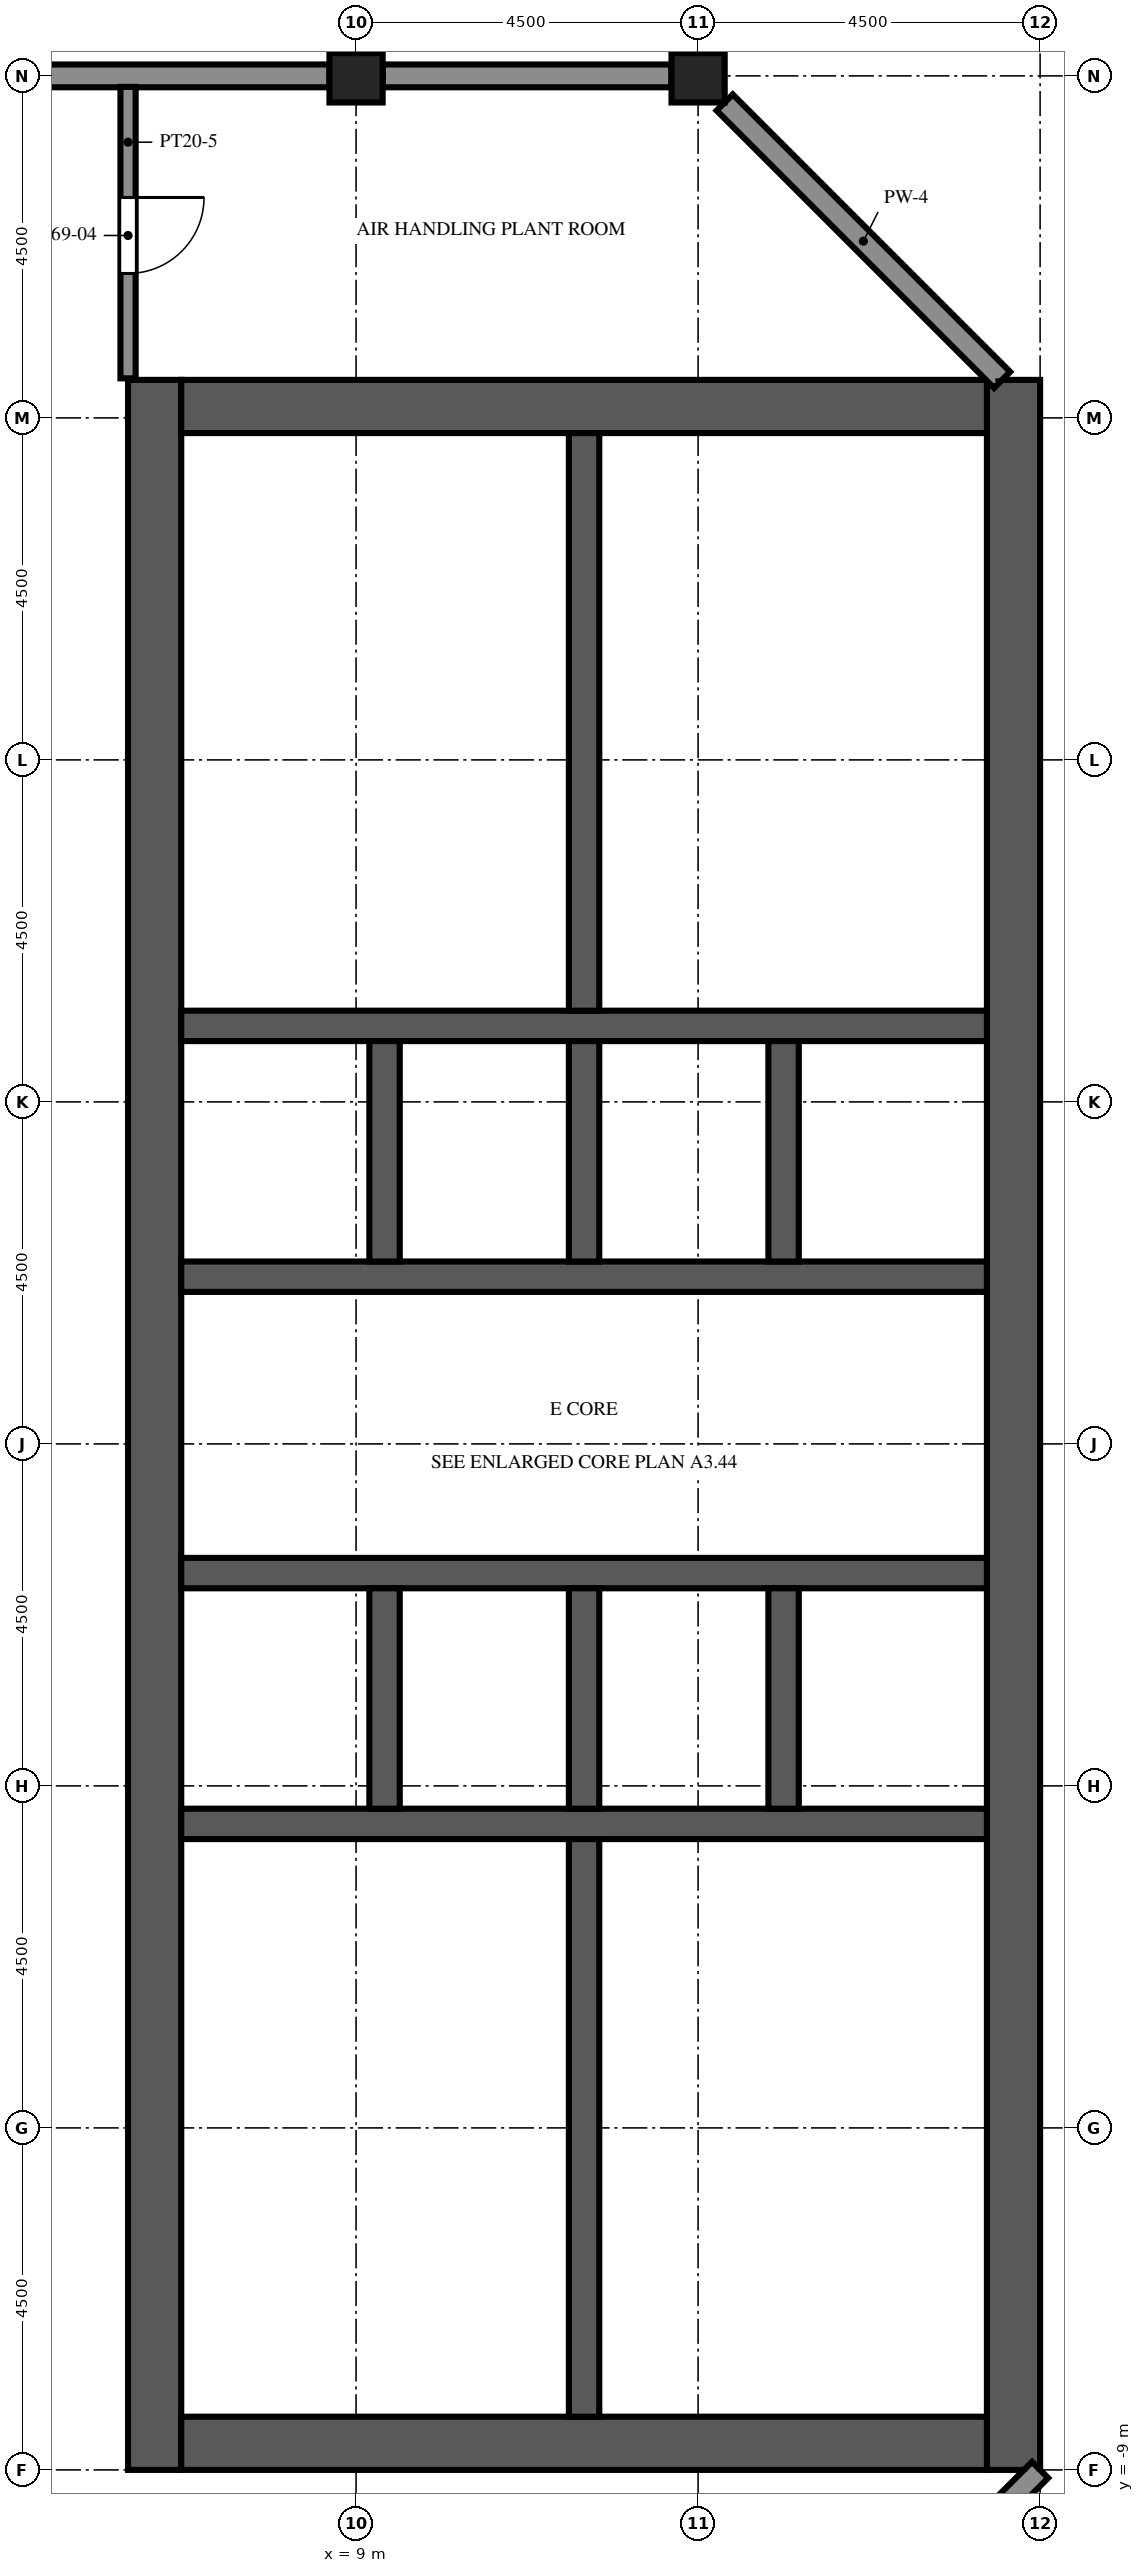
"""IFC4 building model, lengths in metres.
Left out: names, types, materials, properties, quantities, classifications, styles, units other than length and angle.
Written with IfcOpenShell. Run it as: python <this file> out.ifc"""

import sys

from ifc_helpers import new_model, si_unit, direction, frame, frame_2d, origin, origin_2d, place, context, subcontext, project, spatial, rectangle, extrude, element, fill, save


model = new_model("IFC4")
c1 = context("Model", 3, precision=1e-05, world=origin(), true_north=direction((0.0, 1.0)))
c2 = subcontext(c1, "Body", "Model", "MODEL_VIEW")
j1 = project(units=[si_unit("LENGTHUNIT", "METRE"), si_unit("PLANEANGLEUNIT", "RADIAN")], contexts=[c1])
p1 = place(None, origin())
s1 = spatial("IfcSite", under=j1, at=p1, CompositionType="ELEMENT")
p2 = place(p1, origin())
s2 = spatial("IfcBuilding", under=s1, at=p2, CompositionType="ELEMENT")
p3 = place(p2, frame((0.0, 0.0, 306.4)))
s3 = spatial("IfcBuildingStorey", under=s2, at=p3, CompositionType="ELEMENT", Elevation=306.4)
for number, where, z_axis, x_axis in (
    (1, (9.0, 22.5, 0.0), (0.0, 0.0, 1.0), (1.0, 0.0, 0.0)),
    (2, (13.5, 22.5, 0.0), (0.0, 0.0, 1.0), (1.0, 0.0, 0.0)),
):
    element("IfcColumn", number, at=place(p3, frame(where, z_axis=z_axis, x_axis=x_axis)), inside=s3, PredefinedType="COLUMN", context=c2, shape_type="SweptSolid", body=[
        extrude(rectangle(XDim=0.7, YDim=0.7, at=origin_2d()), origin(), (0.0, 0.0, 1.0), 5.4),
    ])
p4 = place(p3, frame((6.35, -9.0, 0.0), z_axis=(0.0, 0.0, 1.0), x_axis=(0.0, 1.0, 0.0)))
e3 = element("IfcWall", 3, at=p4, inside=s3, PredefinedType="SHEAR", context=c2, shape_type="SweptSolid", body=[
    extrude(rectangle(XDim=27.5, YDim=0.7, at=frame_2d((13.75, 0.0))), origin(), (0.0, 0.0, 1.0), 5.4),
])
p5 = place(p4, frame((12.55, 0.0, 0.0)))
e4 = element("IfcOpeningElement", 4, at=p5, cuts=e3, PredefinedType="OPENING", context=c2, shape_type="SweptSolid", body=[
    extrude(rectangle(XDim=2.4, YDim=2.4, at=frame_2d((1.2, 1.2))), frame((0.0, 0.36, 0.0), z_axis=(0.0, -1.0, 0.0), x_axis=(1.0, 0.0, 0.0)), (0.0, 0.0, 1.0), 0.72),
])
p6 = place(p4, frame((3.9, 0.0, 0.0)))
e5 = element("IfcOpeningElement", 5, at=p6, cuts=e3, PredefinedType="OPENING", context=c2, shape_type="SweptSolid", body=[
    extrude(rectangle(XDim=1.2, YDim=2.1, at=frame_2d((0.6, 1.05))), frame((0.0, 0.36, 0.0), z_axis=(0.0, -1.0, 0.0), x_axis=(1.0, 0.0, 0.0)), (0.0, 0.0, 1.0), 0.72),
])
p7 = place(p4, frame((22.4, 0.0, 0.0)))
e6 = element("IfcOpeningElement", 6, at=p7, cuts=e3, PredefinedType="OPENING", context=c2, shape_type="SweptSolid", body=[
    extrude(rectangle(XDim=1.2, YDim=2.1, at=frame_2d((0.6, 1.05))), frame((0.0, 0.36, 0.0), z_axis=(0.0, -1.0, 0.0), x_axis=(1.0, 0.0, 0.0)), (0.0, 0.0, 1.0), 0.72),
])
p8 = place(p3, frame((17.65, -9.0, 0.0), z_axis=(0.0, 0.0, 1.0), x_axis=(0.0, 1.0, 0.0)))
e7 = element("IfcWall", 7, at=p8, inside=s3, PredefinedType="SHEAR", context=c2, shape_type="SweptSolid", body=[
    extrude(rectangle(XDim=27.5, YDim=0.7, at=frame_2d((13.75, 0.0))), origin(), (0.0, 0.0, 1.0), 5.4),
])
for number, where, z_axis, x_axis in (
    (8, (6.7, -8.65, 0.0), (0.0, 0.0, 1.0), (1.0, 0.0, 0.0)),
    (9, (6.7, 18.15, 0.0), (0.0, 0.0, 1.0), (1.0, 0.0, 0.0)),
):
    element("IfcWall", number, at=place(p3, frame(where, z_axis=z_axis, x_axis=x_axis)), inside=s3, PredefinedType="SHEAR", context=c2, shape_type="SweptSolid", body=[
        extrude(rectangle(XDim=10.6, YDim=0.7, at=frame_2d((5.3, 0.0))), origin(), (0.0, 0.0, 1.0), 5.4),
    ])
p9 = place(p3, frame((6.7, -0.5, 0.0), z_axis=(0.0, 0.0, 1.0), x_axis=(1.0, 0.0, 0.0)))
e10 = element("IfcWall", 10, at=p9, inside=s3, PredefinedType="SHEAR", context=c2, shape_type="SweptSolid", body=[
    extrude(rectangle(XDim=10.6, YDim=0.4, at=frame_2d((5.3, 0.0))), origin(), (0.0, 0.0, 1.0), 5.4),
])
p10 = place(p3, frame((6.7, 2.8, 0.0), z_axis=(0.0, 0.0, 1.0), x_axis=(1.0, 0.0, 0.0)))
e11 = element("IfcWall", 11, at=p10, inside=s3, PredefinedType="SHEAR", context=c2, shape_type="SweptSolid", body=[
    extrude(rectangle(XDim=10.6, YDim=0.4, at=frame_2d((5.3, 0.0))), origin(), (0.0, 0.0, 1.0), 5.4),
])
p11 = place(p10, frame((0.688, 0.0, 0.0)))
e12 = element("IfcOpeningElement", 12, at=p11, cuts=e11, PredefinedType="OPENING", context=c2, shape_type="SweptSolid", body=[
    extrude(rectangle(XDim=1.1, YDim=2.1, at=frame_2d((0.55, 1.05))), frame((0.0, 0.21, 0.0), z_axis=(0.0, -1.0, 0.0), x_axis=(1.0, 0.0, 0.0)), (0.0, 0.0, 1.0), 0.42),
])
p12 = place(p10, frame((3.438, 0.0, 0.0)))
e13 = element("IfcOpeningElement", 13, at=p12, cuts=e11, PredefinedType="OPENING", context=c2, shape_type="SweptSolid", body=[
    extrude(rectangle(XDim=1.1, YDim=2.1, at=frame_2d((0.55, 1.05))), frame((0.0, 0.21, 0.0), z_axis=(0.0, -1.0, 0.0), x_axis=(1.0, 0.0, 0.0)), (0.0, 0.0, 1.0), 0.42),
])
p13 = place(p10, frame((6.113, 0.0, 0.0)))
e14 = element("IfcOpeningElement", 14, at=p13, cuts=e11, PredefinedType="OPENING", context=c2, shape_type="SweptSolid", body=[
    extrude(rectangle(XDim=1.0, YDim=2.1, at=frame_2d((0.5, 1.05))), frame((0.0, 0.21, 0.0), z_axis=(0.0, -1.0, 0.0), x_axis=(1.0, 0.0, 0.0)), (0.0, 0.0, 1.0), 0.42),
])
p14 = place(p10, frame((8.863, 0.0, 0.0)))
e15 = element("IfcOpeningElement", 15, at=p14, cuts=e11, PredefinedType="OPENING", context=c2, shape_type="SweptSolid", body=[
    extrude(rectangle(XDim=1.0, YDim=2.1, at=frame_2d((0.5, 1.05))), frame((0.0, 0.21, 0.0), z_axis=(0.0, -1.0, 0.0), x_axis=(1.0, 0.0, 0.0)), (0.0, 0.0, 1.0), 0.42),
])
p15 = place(p3, frame((6.7, 6.7, 0.0), z_axis=(0.0, 0.0, 1.0), x_axis=(1.0, 0.0, 0.0)))
e16 = element("IfcWall", 16, at=p15, inside=s3, PredefinedType="SHEAR", context=c2, shape_type="SweptSolid", body=[
    extrude(rectangle(XDim=10.6, YDim=0.4, at=frame_2d((5.3, 0.0))), origin(), (0.0, 0.0, 1.0), 5.4),
])
p16 = place(p15, frame((0.738, 0.0, 0.0)))
e17 = element("IfcOpeningElement", 17, at=p16, cuts=e16, PredefinedType="OPENING", context=c2, shape_type="SweptSolid", body=[
    extrude(rectangle(XDim=1.0, YDim=2.1, at=frame_2d((0.5, 1.05))), frame((0.0, 0.21, 0.0), z_axis=(0.0, -1.0, 0.0), x_axis=(1.0, 0.0, 0.0)), (0.0, 0.0, 1.0), 0.42),
])
p17 = place(p15, frame((3.488, 0.0, 0.0)))
e18 = element("IfcOpeningElement", 18, at=p17, cuts=e16, PredefinedType="OPENING", context=c2, shape_type="SweptSolid", body=[
    extrude(rectangle(XDim=1.0, YDim=2.1, at=frame_2d((0.5, 1.05))), frame((0.0, 0.21, 0.0), z_axis=(0.0, -1.0, 0.0), x_axis=(1.0, 0.0, 0.0)), (0.0, 0.0, 1.0), 0.42),
])
p18 = place(p15, frame((6.113, 0.0, 0.0)))
e19 = element("IfcOpeningElement", 19, at=p18, cuts=e16, PredefinedType="OPENING", context=c2, shape_type="SweptSolid", body=[
    extrude(rectangle(XDim=1.0, YDim=2.1, at=frame_2d((0.5, 1.05))), frame((0.0, 0.21, 0.0), z_axis=(0.0, -1.0, 0.0), x_axis=(1.0, 0.0, 0.0)), (0.0, 0.0, 1.0), 0.42),
])
p19 = place(p15, frame((8.863, 0.0, 0.0)))
e20 = element("IfcOpeningElement", 20, at=p19, cuts=e16, PredefinedType="OPENING", context=c2, shape_type="SweptSolid", body=[
    extrude(rectangle(XDim=1.0, YDim=2.1, at=frame_2d((0.5, 1.05))), frame((0.0, 0.21, 0.0), z_axis=(0.0, -1.0, 0.0), x_axis=(1.0, 0.0, 0.0)), (0.0, 0.0, 1.0), 0.42),
])
p20 = place(p3, frame((6.7, 10.0, 0.0), z_axis=(0.0, 0.0, 1.0), x_axis=(1.0, 0.0, 0.0)))
e21 = element("IfcWall", 21, at=p20, inside=s3, PredefinedType="SHEAR", context=c2, shape_type="SweptSolid", body=[
    extrude(rectangle(XDim=10.6, YDim=0.4, at=frame_2d((5.3, 0.0))), origin(), (0.0, 0.0, 1.0), 5.4),
])
for number, where, z_axis, x_axis in (
    (22, (9.375, -0.3, 0.0), (0.0, 0.0, 1.0), (0.0, 1.0, 0.0)),
    (23, (9.375, 6.9, 0.0), (0.0, 0.0, 1.0), (0.0, 1.0, 0.0)),
    (24, (12.0, -0.3, 0.0), (0.0, 0.0, 1.0), (0.0, 1.0, 0.0)),
    (25, (12.0, 6.9, 0.0), (0.0, 0.0, 1.0), (0.0, 1.0, 0.0)),
    (26, (14.625, -0.3, 0.0), (0.0, 0.0, 1.0), (0.0, 1.0, 0.0)),
    (27, (14.625, 6.9, 0.0), (0.0, 0.0, 1.0), (0.0, 1.0, 0.0)),
):
    element("IfcWall", number, at=place(p3, frame(where, z_axis=z_axis, x_axis=x_axis)), inside=s3, PredefinedType="SHEAR", context=c2, shape_type="SweptSolid", body=[
        extrude(rectangle(XDim=2.9, YDim=0.4, at=frame_2d((1.45, 0.0))), origin(), (0.0, 0.0, 1.0), 5.4),
    ])
p21 = place(p3, frame((12.0, -8.3, 0.0), z_axis=(0.0, 0.0, 1.0), x_axis=(0.0, 1.0, 0.0)))
e28 = element("IfcWall", 28, at=p21, inside=s3, PredefinedType="SHEAR", context=c2, shape_type="SweptSolid", body=[
    extrude(rectangle(XDim=7.6, YDim=0.4, at=frame_2d((3.8, 0.0))), origin(), (0.0, 0.0, 1.0), 5.4),
])
p22 = place(p21, frame((6.125, 0.0, 0.0)))
e29 = element("IfcOpeningElement", 29, at=p22, cuts=e28, PredefinedType="OPENING", context=c2, shape_type="SweptSolid", body=[
    extrude(rectangle(XDim=1.2, YDim=2.1, at=frame_2d((0.6, 1.05))), frame((0.0, 0.21, 0.0), z_axis=(0.0, -1.0, 0.0), x_axis=(1.0, 0.0, 0.0)), (0.0, 0.0, 1.0), 0.42),
])
p23 = place(p3, frame((12.0, 10.2, 0.0), z_axis=(0.0, 0.0, 1.0), x_axis=(0.0, 1.0, 0.0)))
e30 = element("IfcWall", 30, at=p23, inside=s3, PredefinedType="SHEAR", context=c2, shape_type="SweptSolid", body=[
    extrude(rectangle(XDim=7.6, YDim=0.4, at=frame_2d((3.8, 0.0))), origin(), (0.0, 0.0, 1.0), 5.4),
])
p24 = place(p23, frame((0.275, 0.0, 0.0)))
e31 = element("IfcOpeningElement", 31, at=p24, cuts=e30, PredefinedType="OPENING", context=c2, shape_type="SweptSolid", body=[
    extrude(rectangle(XDim=1.2, YDim=2.1, at=frame_2d((0.6, 1.05))), frame((0.0, 0.21, 0.0), z_axis=(0.0, -1.0, 0.0), x_axis=(1.0, 0.0, 0.0)), (0.0, 0.0, 1.0), 0.42),
])
p25 = place(p3, frame((13.85, -13.15, 0.0), z_axis=(0.0, 0.0, 1.0), x_axis=(0.707106781187, 0.707106781187, 0.0)))
e32 = element("IfcWall", 32, at=p25, inside=s3, PredefinedType="SOLIDWALL", context=c2, shape_type="SweptSolid", body=[
    extrude(rectangle(XDim=5.869, YDim=0.3, at=frame_2d((2.935, 0.0))), origin(), (0.0, 0.0, 1.0), 4.1),
])
p26 = place(p3, frame((17.5, 18.5, 0.0), z_axis=(0.0, 0.0, 1.0), x_axis=(-0.707106781187, 0.707106781187, 0.0)))
e33 = element("IfcWall", 33, at=p26, inside=s3, PredefinedType="SOLIDWALL", context=c2, shape_type="SweptSolid", body=[
    extrude(rectangle(XDim=5.162, YDim=0.3, at=frame_2d((2.581, 0.0))), origin(), (0.0, 0.0, 1.0), 4.1),
])
for number, where, z_axis, x_axis in (
    (34, (13.15, 22.5, 0.0), (0.0, 0.0, 1.0), (-1.0, 0.0, 0.0)),
    (35, (8.65, 22.5, 0.0), (0.0, 0.0, 1.0), (-1.0, 0.0, 0.0)),
):
    element("IfcWall", number, at=place(p3, frame(where, z_axis=z_axis, x_axis=x_axis)), inside=s3, PredefinedType="SOLIDWALL", context=c2, shape_type="SweptSolid", body=[
        extrude(rectangle(XDim=3.8, YDim=0.3, at=frame_2d((1.9, 0.0))), origin(), (0.0, 0.0, 1.0), 0.85),
    ])
p27 = place(p3, frame((6.0, 22.355, 0.0), z_axis=(0.0, 0.0, 1.0), x_axis=(0.0, -1.0, 0.0)))
e36 = element("IfcWall", 36, at=p27, inside=s3, PredefinedType="PARTITIONING", context=c2, shape_type="SweptSolid", body=[
    extrude(rectangle(XDim=3.835, YDim=0.2, at=frame_2d((1.917, 0.0))), origin(), (0.0, 0.0, 1.0), 4.8),
])
p28 = place(p27, frame((1.455, 0.0, 0.0)))
e37 = element("IfcOpeningElement", 37, at=p28, cuts=e36, PredefinedType="OPENING", context=c2, shape_type="SweptSolid", body=[
    extrude(rectangle(XDim=1.0, YDim=2.1, at=frame_2d((0.5, 1.05))), frame((0.0, 0.11, 0.0), z_axis=(0.0, -1.0, 0.0), x_axis=(1.0, 0.0, 0.0)), (0.0, 0.0, 1.0), 0.22),
])
p29 = place(p28, origin())
e38 = element("IfcDoor", 38, at=p29, inside=s3, OperationType="SINGLE_SWING_LEFT", PredefinedType="DOOR", context=c2, shape_type="SweptSolid", body=[
    extrude(rectangle(XDim=1.0, YDim=2.1, at=frame_2d((0.5, 1.05))), frame((0.0, 0.025, 0.0), z_axis=(0.0, -1.0, 0.0), x_axis=(1.0, 0.0, 0.0)), (0.0, 0.0, 1.0), 0.05),
])
fill(e37, e38)
p30 = place(p11, origin())
e39 = element("IfcDoor", 39, at=p30, inside=s3, OperationType="DOUBLE_DOOR_SLIDING", PredefinedType="DOOR", context=c2, shape_type="SweptSolid", body=[
    extrude(rectangle(XDim=1.1, YDim=2.1, at=frame_2d((0.55, 1.05))), frame((0.0, 0.025, 0.0), z_axis=(0.0, -1.0, 0.0), x_axis=(1.0, 0.0, 0.0)), (0.0, 0.0, 1.0), 0.05),
])
fill(e12, e39)
p31 = place(p12, origin())
e40 = element("IfcDoor", 40, at=p31, inside=s3, OperationType="DOUBLE_DOOR_SLIDING", PredefinedType="DOOR", context=c2, shape_type="SweptSolid", body=[
    extrude(rectangle(XDim=1.1, YDim=2.1, at=frame_2d((0.55, 1.05))), frame((0.0, 0.025, 0.0), z_axis=(0.0, -1.0, 0.0), x_axis=(1.0, 0.0, 0.0)), (0.0, 0.0, 1.0), 0.05),
])
fill(e13, e40)
p32 = place(p5, origin())
e41 = element("IfcDoor", 41, at=p32, inside=s3, OperationType="DOUBLE_DOOR_DOUBLE_SWING", PredefinedType="DOOR", context=c2, shape_type="SweptSolid", body=[
    extrude(rectangle(XDim=2.4, YDim=2.4, at=frame_2d((1.2, 1.2))), frame((0.0, 0.025, 0.0), z_axis=(0.0, -1.0, 0.0), x_axis=(1.0, 0.0, 0.0)), (0.0, 0.0, 1.0), 0.05),
])
fill(e4, e41)
p33 = place(p22, origin())
e42 = element("IfcDoor", 42, at=p33, inside=s3, OperationType="SINGLE_SWING_RIGHT", PredefinedType="DOOR", context=c2, shape_type="SweptSolid", body=[
    extrude(rectangle(XDim=1.2, YDim=2.1, at=frame_2d((0.6, 1.05))), frame((0.0, 0.025, 0.0), z_axis=(0.0, -1.0, 0.0), x_axis=(1.0, 0.0, 0.0)), (0.0, 0.0, 1.0), 0.05),
])
fill(e29, e42)
p34 = place(p24, origin())
e43 = element("IfcDoor", 43, at=p34, inside=s3, OperationType="SINGLE_SWING_RIGHT", PredefinedType="DOOR", context=c2, shape_type="SweptSolid", body=[
    extrude(rectangle(XDim=1.2, YDim=2.1, at=frame_2d((0.6, 1.05))), frame((0.0, 0.025, 0.0), z_axis=(0.0, -1.0, 0.0), x_axis=(1.0, 0.0, 0.0)), (0.0, 0.0, 1.0), 0.05),
])
fill(e31, e43)
p35 = place(p13, origin())
e44 = element("IfcDoor", 44, at=p35, inside=s3, OperationType="SINGLE_SWING_LEFT", PredefinedType="DOOR", context=c2, shape_type="SweptSolid", body=[
    extrude(rectangle(XDim=1.0, YDim=2.1, at=frame_2d((0.5, 1.05))), frame((0.0, 0.025, 0.0), z_axis=(0.0, -1.0, 0.0), x_axis=(1.0, 0.0, 0.0)), (0.0, 0.0, 1.0), 0.05),
])
fill(e14, e44)
p36 = place(p14, origin())
e45 = element("IfcDoor", 45, at=p36, inside=s3, OperationType="SINGLE_SWING_RIGHT", PredefinedType="DOOR", context=c2, shape_type="SweptSolid", body=[
    extrude(rectangle(XDim=1.0, YDim=2.1, at=frame_2d((0.5, 1.05))), frame((0.0, 0.025, 0.0), z_axis=(0.0, -1.0, 0.0), x_axis=(1.0, 0.0, 0.0)), (0.0, 0.0, 1.0), 0.05),
])
fill(e15, e45)
p37 = place(p16, origin())
e46 = element("IfcDoor", 46, at=p37, inside=s3, OperationType="SINGLE_SWING_LEFT", PredefinedType="DOOR", context=c2, shape_type="SweptSolid", body=[
    extrude(rectangle(XDim=1.0, YDim=2.1, at=frame_2d((0.5, 1.05))), frame((0.0, 0.025, 0.0), z_axis=(0.0, -1.0, 0.0), x_axis=(1.0, 0.0, 0.0)), (0.0, 0.0, 1.0), 0.05),
])
fill(e17, e46)
p38 = place(p17, origin())
e47 = element("IfcDoor", 47, at=p38, inside=s3, OperationType="SINGLE_SWING_RIGHT", PredefinedType="DOOR", context=c2, shape_type="SweptSolid", body=[
    extrude(rectangle(XDim=1.0, YDim=2.1, at=frame_2d((0.5, 1.05))), frame((0.0, 0.025, 0.0), z_axis=(0.0, -1.0, 0.0), x_axis=(1.0, 0.0, 0.0)), (0.0, 0.0, 1.0), 0.05),
])
fill(e18, e47)
p39 = place(p18, origin())
e48 = element("IfcDoor", 48, at=p39, inside=s3, OperationType="SINGLE_SWING_LEFT", PredefinedType="DOOR", context=c2, shape_type="SweptSolid", body=[
    extrude(rectangle(XDim=1.0, YDim=2.1, at=frame_2d((0.5, 1.05))), frame((0.0, 0.025, 0.0), z_axis=(0.0, -1.0, 0.0), x_axis=(1.0, 0.0, 0.0)), (0.0, 0.0, 1.0), 0.05),
])
fill(e19, e48)
p40 = place(p19, origin())
e49 = element("IfcDoor", 49, at=p40, inside=s3, OperationType="SINGLE_SWING_RIGHT", PredefinedType="DOOR", context=c2, shape_type="SweptSolid", body=[
    extrude(rectangle(XDim=1.0, YDim=2.1, at=frame_2d((0.5, 1.05))), frame((0.0, 0.025, 0.0), z_axis=(0.0, -1.0, 0.0), x_axis=(1.0, 0.0, 0.0)), (0.0, 0.0, 1.0), 0.05),
])
fill(e20, e49)
p41 = place(p6, origin())
e50 = element("IfcDoor", 50, at=p41, inside=s3, OperationType="SINGLE_SWING_RIGHT", PredefinedType="DOOR", context=c2, shape_type="SweptSolid", body=[
    extrude(rectangle(XDim=1.2, YDim=2.1, at=frame_2d((0.6, 1.05))), frame((0.0, -0.275, 0.0), z_axis=(0.0, -1.0, 0.0), x_axis=(1.0, 0.0, 0.0)), (0.0, 0.0, 1.0), 0.05),
])
fill(e5, e50)
p42 = place(p7, origin())
e51 = element("IfcDoor", 51, at=p42, inside=s3, OperationType="SINGLE_SWING_RIGHT", PredefinedType="DOOR", context=c2, shape_type="SweptSolid", body=[
    extrude(rectangle(XDim=1.2, YDim=2.1, at=frame_2d((0.6, 1.05))), frame((0.0, -0.275, 0.0), z_axis=(0.0, -1.0, 0.0), x_axis=(1.0, 0.0, 0.0)), (0.0, 0.0, 1.0), 0.05),
])
fill(e6, e51)
save(model, sys.argv[1])
